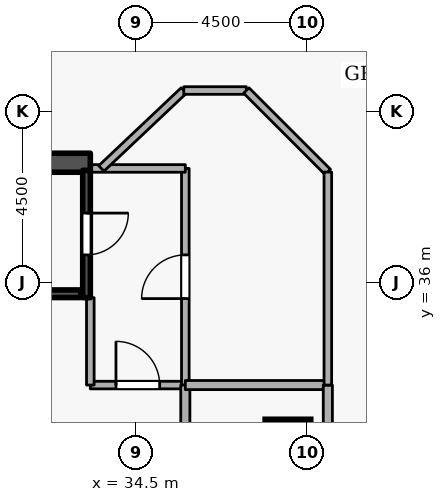
"""IFC4 building model, lengths in metres.
Left out: names, types, materials, properties, quantities, classifications, styles, units other than length and angle.
Written with IfcOpenShell. Run it as: python <this file> out.ifc"""

import sys

from ifc_helpers import new_model, si_unit, direction, frame, frame_2d, origin, origin_2d, place, context, subcontext, project, spatial, rectangle, extrude, element, fill, save


model = new_model("IFC4")
c1 = context("Model", 3, precision=1e-05, world=origin(), true_north=direction((0.0, 1.0)))
c2 = subcontext(c1, "Body", "Model", "MODEL_VIEW")
j1 = project(units=[si_unit("LENGTHUNIT", "METRE"), si_unit("PLANEANGLEUNIT", "RADIAN")], contexts=[c1])
p1 = place(None, origin())
s1 = spatial("IfcSite", under=j1, at=p1, CompositionType="ELEMENT")
p2 = place(p1, origin())
s2 = spatial("IfcBuilding", under=s1, at=p2, CompositionType="ELEMENT")
p3 = place(p2, frame((0.0, 0.0, 141.3)))
s3 = spatial("IfcBuildingStorey", under=s2, at=p3, CompositionType="ELEMENT", Elevation=141.3)
p4 = place(p3, frame((17.7, 39.15, 0.0), z_axis=(0.0, 0.0, 1.0), x_axis=(1.0, 0.0, 0.0)))
e1 = element("IfcWall", 1, at=p4, inside=s3, PredefinedType="SHEAR", context=c2, shape_type="SweptSolid", body=[
    extrude(rectangle(XDim=15.6, YDim=0.5, at=frame_2d((7.8, 0.0))), origin(), (0.0, 0.0, 1.0), 4.2),
])
p5 = place(p3, frame((38.5, 31.8, 0.0), z_axis=(0.0, 0.0, 1.0), x_axis=(1.0, 0.0, 0.0)))
e2 = element("IfcColumn", 2, at=p5, inside=s3, PredefinedType="COLUMN", context=c2, shape_type="SweptSolid", body=[
    extrude(rectangle(XDim=1.2, YDim=1.2, at=origin_2d()), origin(), (0.0, 0.0, 1.0), 4.2),
])
p6 = place(p3, frame((33.2, 38.95, 0.0), z_axis=(0.0, 0.0, 1.0), x_axis=(0.0, -1.0, 0.0)))
e3 = element("IfcWall", 3, at=p6, inside=s3, PredefinedType="SHEAR", context=c2, shape_type="SweptSolid", body=[
    extrude(rectangle(XDim=3.35, YDim=0.2, at=frame_2d((1.675, 0.0))), origin(), (0.0, 0.0, 1.0), 4.2),
])
p7 = place(p6, frame((1.125, 0.0, 0.0)))
e4 = element("IfcOpeningElement", 4, at=p7, cuts=e3, PredefinedType="OPENING", context=c2, shape_type="SweptSolid", body=[
    extrude(rectangle(XDim=1.1, YDim=2.1, at=frame_2d((0.55, 1.05))), frame((0.0, 0.11, 0.0), z_axis=(0.0, -1.0, 0.0), x_axis=(1.0, 0.0, 0.0)), (0.0, 0.0, 1.0), 0.22),
])
p8 = place(p3, frame((25.95, 35.703, 0.0), z_axis=(0.0, 0.0, 1.0), x_axis=(1.0, 0.0, 0.0)))
e5 = element("IfcWall", 5, at=p8, inside=s3, PredefinedType="SHEAR", context=c2, shape_type="SweptSolid", body=[
    extrude(rectangle(XDim=7.1, YDim=0.2, at=frame_2d((3.55, 0.0))), origin(), (0.0, 0.0, 1.0), 4.2),
])
p9 = place(p3, frame((33.3, 33.3, 0.0), z_axis=(0.0, 0.0, 1.0), x_axis=(1.0, 0.0, 0.0)))
e6 = element("IfcWall", 6, at=p9, inside=s3, PredefinedType="STANDARD", context=c2, shape_type="SweptSolid", body=[
    extrude(rectangle(XDim=2.5, YDim=0.2, at=frame_2d((1.25, 0.0))), origin(), (0.0, 0.0, 1.0), 3.94),
])
p10 = place(p9, frame((0.675, 0.0, 0.0)))
e7 = element("IfcOpeningElement", 7, at=p10, cuts=e6, PredefinedType="OPENING", context=c2, shape_type="SweptSolid", body=[
    extrude(rectangle(XDim=1.15, YDim=2.1, at=frame_2d((0.575, 1.05))), frame((0.0, 0.11, 0.0), z_axis=(0.0, -1.0, 0.0), x_axis=(1.0, 0.0, 0.0)), (0.0, 0.0, 1.0), 0.22),
])
p11 = place(p3, frame((35.8, 33.3, 0.0), z_axis=(0.0, 0.0, 1.0), x_axis=(0.0, 1.0, 0.0)))
e8 = element("IfcWall", 8, at=p11, inside=s3, PredefinedType="STANDARD", context=c2, shape_type="SweptSolid", body=[
    extrude(rectangle(XDim=5.7, YDim=0.2, at=frame_2d((2.85, 0.0))), origin(), (0.0, 0.0, 1.0), 3.94),
])
p12 = place(p11, frame((2.275, 0.0, 0.0)))
e9 = element("IfcOpeningElement", 9, at=p12, cuts=e8, PredefinedType="OPENING", context=c2, shape_type="SweptSolid", body=[
    extrude(rectangle(XDim=1.15, YDim=2.1, at=frame_2d((0.575, 1.05))), frame((0.0, 0.11, 0.0), z_axis=(0.0, -1.0, 0.0), x_axis=(1.0, 0.0, 0.0)), (0.0, 0.0, 1.0), 0.22),
])
p13 = place(p3, frame((35.8, 39.0, 0.0), z_axis=(0.0, 0.0, 1.0), x_axis=(-1.0, 0.0, 0.0)))
e10 = element("IfcWall", 10, at=p13, inside=s3, PredefinedType="STANDARD", context=c2, shape_type="SweptSolid", body=[
    extrude(rectangle(XDim=2.5, YDim=0.2, at=frame_2d((1.25, 0.0))), origin(), (0.0, 0.0, 1.0), 3.94),
])
p14 = place(p3, frame((33.3, 35.6, 0.0), z_axis=(0.0, 0.0, 1.0), x_axis=(0.0, -1.0, 0.0)))
e11 = element("IfcWall", 11, at=p14, inside=s3, PredefinedType="STANDARD", context=c2, shape_type="SweptSolid", body=[
    extrude(rectangle(XDim=2.3, YDim=0.2, at=frame_2d((1.15, 0.0))), origin(), (0.0, 0.0, 1.0), 3.145),
])
p15 = place(p3, frame((35.8, 31.4, 0.0), z_axis=(0.0, 0.0, 1.0), x_axis=(0.0, 1.0, 0.0)))
e12 = element("IfcWall", 12, at=p15, inside=s3, PredefinedType="STANDARD", context=c2, shape_type="SweptSolid", body=[
    extrude(rectangle(XDim=1.9, YDim=0.24, at=frame_2d((0.95, 0.0))), origin(), (0.0, 0.0, 1.0), 3.94),
])
p16 = place(p3, frame((35.8, 33.3, 0.0), z_axis=(0.0, 0.0, 1.0), x_axis=(1.0, 0.0, 0.0)))
e13 = element("IfcWall", 13, at=p16, inside=s3, PredefinedType="STANDARD", context=c2, shape_type="SweptSolid", body=[
    extrude(rectangle(XDim=3.75, YDim=0.24, at=frame_2d((1.875, 0.0))), origin(), (0.0, 0.0, 1.0), 3.94),
])
p17 = place(p3, frame((39.55, 33.3, 0.0), z_axis=(0.0, 0.0, 1.0), x_axis=(0.0, -1.0, 0.0)))
e14 = element("IfcWall", 14, at=p17, inside=s3, PredefinedType="STANDARD", context=c2, shape_type="SweptSolid", body=[
    extrude(rectangle(XDim=3.92, YDim=0.24, at=frame_2d((1.96, 0.0))), origin(), (0.0, 0.0, 1.0), 3.94),
])
p18 = place(p3, frame((33.59, 39.0, 0.0), z_axis=(0.0, 0.0, 1.0), x_axis=(0.726822582944, 0.686825256468, 0.0)))
e15 = element("IfcWall", 15, at=p18, inside=s3, PredefinedType="STANDARD", context=c2, shape_type="SweptSolid", body=[
    extrude(rectangle(XDim=2.985, YDim=0.2, at=frame_2d((1.492, 0.0))), origin(), (0.0, 0.0, 1.0), 3.94),
])
p19 = place(p3, frame((35.76, 41.05, 0.0), z_axis=(0.0, 0.0, 1.0), x_axis=(1.0, 0.0, 0.0)))
e16 = element("IfcWall", 16, at=p19, inside=s3, PredefinedType="STANDARD", context=c2, shape_type="SweptSolid", body=[
    extrude(rectangle(XDim=1.646, YDim=0.2, at=frame_2d((0.823, 0.0))), origin(), (0.0, 0.0, 1.0), 3.445),
])
p20 = place(p3, frame((37.405, 41.05, 0.0), z_axis=(0.0, 0.0, 1.0), x_axis=(0.707106781187, -0.707106781187, 0.0)))
e17 = element("IfcWall", 17, at=p20, inside=s3, PredefinedType="STANDARD", context=c2, shape_type="SweptSolid", body=[
    extrude(rectangle(XDim=3.033, YDim=0.2, at=frame_2d((1.517, 0.0))), origin(), (0.0, 0.0, 1.0), 3.94),
])
p21 = place(p3, frame((39.55, 38.905, 0.0), z_axis=(0.0, 0.0, 1.0), x_axis=(0.0, -1.0, 0.0)))
e18 = element("IfcWall", 18, at=p21, inside=s3, PredefinedType="STANDARD", context=c2, shape_type="SweptSolid", body=[
    extrude(rectangle(XDim=5.605, YDim=0.2, at=frame_2d((2.803, 0.0))), origin(), (0.0, 0.0, 1.0), 3.94),
])
p22 = place(p7, origin())
e19 = element("IfcDoor", 19, at=p22, inside=s3, OperationType="SINGLE_SWING_LEFT", PredefinedType="DOOR", context=c2, shape_type="SweptSolid", body=[
    extrude(rectangle(XDim=1.1, YDim=2.1, at=frame_2d((0.55, 1.05))), frame((0.0, 0.025, 0.0), z_axis=(0.0, -1.0, 0.0), x_axis=(1.0, 0.0, 0.0)), (0.0, 0.0, 1.0), 0.05),
])
fill(e4, e19)
p23 = place(p10, origin())
e20 = element("IfcDoor", 20, at=p23, inside=s3, OperationType="SINGLE_SWING_LEFT", PredefinedType="DOOR", context=c2, shape_type="SweptSolid", body=[
    extrude(rectangle(XDim=1.15, YDim=2.1, at=frame_2d((0.575, 1.05))), frame((0.0, 0.025, 0.0), z_axis=(0.0, -1.0, 0.0), x_axis=(1.0, 0.0, 0.0)), (0.0, 0.0, 1.0), 0.05),
])
fill(e7, e20)
p24 = place(p12, origin())
e21 = element("IfcDoor", 21, at=p24, inside=s3, OperationType="SINGLE_SWING_LEFT", PredefinedType="DOOR", context=c2, shape_type="SweptSolid", body=[
    extrude(rectangle(XDim=1.15, YDim=2.1, at=frame_2d((0.575, 1.05))), frame((0.0, 0.025, 0.0), z_axis=(0.0, -1.0, 0.0), x_axis=(1.0, 0.0, 0.0)), (0.0, 0.0, 1.0), 0.05),
])
fill(e9, e21)
save(model, sys.argv[1])
